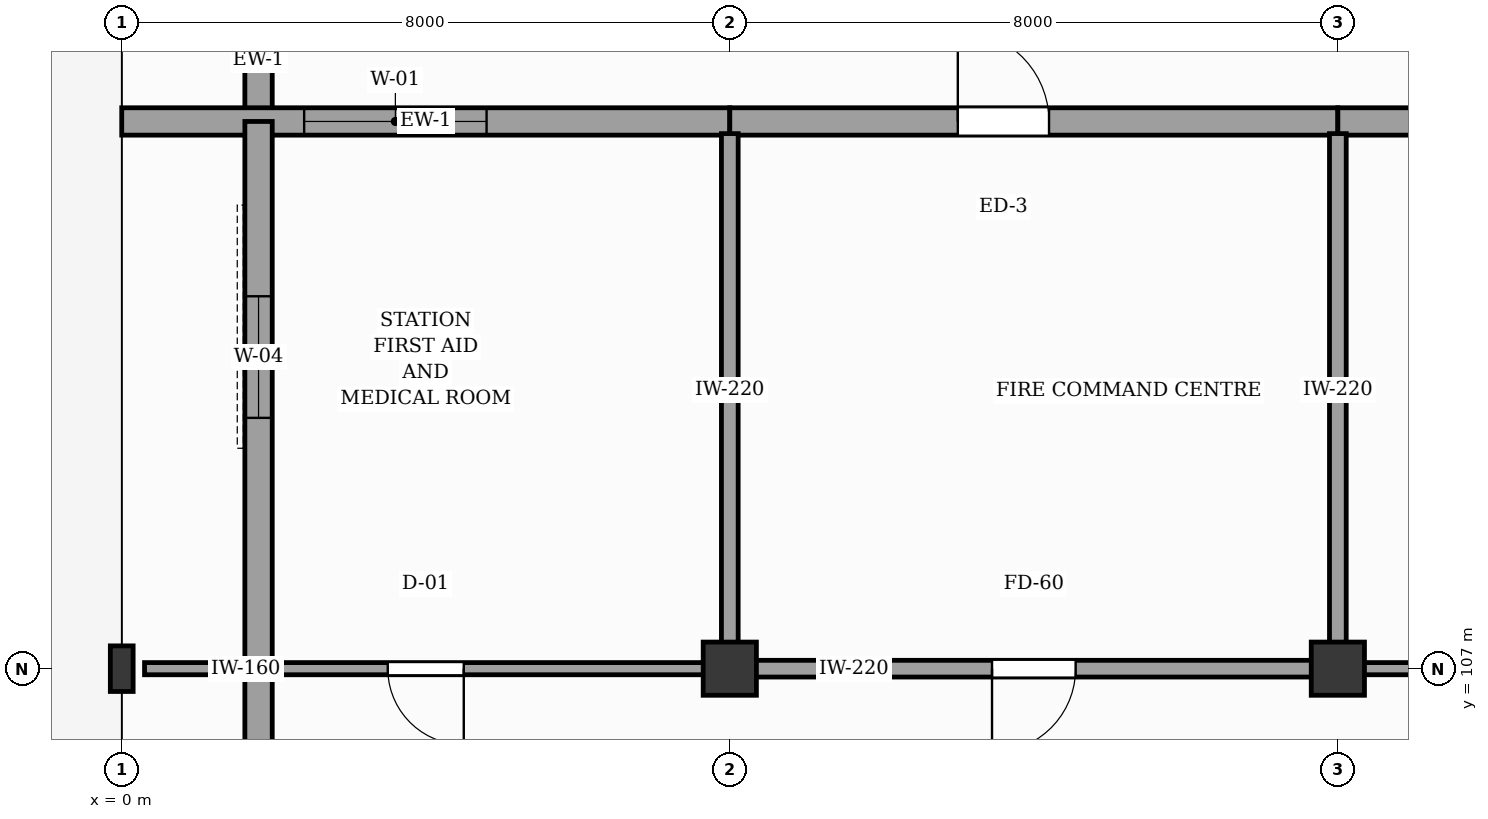
"""IFC4 building model, lengths in metres.
Left out: names, types, materials, properties, quantities, classifications, styles, units other than length and angle.
Written with IfcOpenShell. Run it as: python <this file> out.ifc"""

import sys

from ifc_helpers import new_model, si_unit, direction, frame, frame_2d, origin, origin_2d, place, context, subcontext, project, spatial, rectangle, i_section, extrude, element, fill, save


model = new_model("IFC4")
c1 = context("Model", 3, precision=1e-05, world=origin(), true_north=direction((0.0, 1.0)))
c2 = subcontext(c1, "Body", "Model", "MODEL_VIEW")
j1 = project(units=[si_unit("LENGTHUNIT", "METRE"), si_unit("PLANEANGLEUNIT", "RADIAN")], contexts=[c1])
p1 = place(None, origin())
s1 = spatial("IfcSite", under=j1, at=p1, CompositionType="ELEMENT")
p2 = place(p1, origin())
s2 = spatial("IfcBuilding", under=s1, at=p2, CompositionType="ELEMENT")
p3 = place(p2, origin())
s3 = spatial("IfcBuildingStorey", under=s2, at=p3, CompositionType="ELEMENT", Elevation=0.0)
p4 = place(p3, frame((0.0, 107.0, -0.3), z_axis=(0.0, 0.0, 1.0), x_axis=(1.0, 0.0, 0.0)))
e1 = element("IfcColumn", 1, at=p4, inside=s3, PredefinedType="COLUMN", context=c2, shape_type="SweptSolid", body=[
    extrude(i_section(OverallWidth=0.3, OverallDepth=0.6, WebThickness=0.015, FlangeThickness=0.03, FilletRadius=0.027, at=origin_2d()), origin(), (0.0, 0.0, 1.0), 5.1),
])
for number, where, z_axis, x_axis in (
    (2, (8.0, 107.0, -0.3), (0.0, 0.0, 1.0), (1.0, 0.0, 0.0)),
    (3, (16.0, 107.0, -0.3), (0.0, 0.0, 1.0), (1.0, 0.0, 0.0)),
):
    element("IfcColumn", number, at=place(p3, frame(where, z_axis=z_axis, x_axis=x_axis)), inside=s3, PredefinedType="COLUMN", context=c2, shape_type="SweptSolid", body=[
        extrude(rectangle(XDim=0.7, YDim=0.7, at=origin_2d()), origin(), (0.0, 0.0, 1.0), 5.1),
    ])
p5 = place(p3, frame((1.8, 114.02, 0.0), z_axis=(0.0, 0.0, 1.0), x_axis=(0.0, 1.0, 0.0)))
e4 = element("IfcWall", 4, at=p5, inside=s3, PredefinedType="SOLIDWALL", context=c2, shape_type="SweptSolid", body=[
    extrude(rectangle(XDim=1.98, YDim=0.36, at=frame_2d((0.99, 0.0))), origin(), (0.0, 0.0, 1.0), 3.84),
])
p6 = place(p3, frame((0.0, 114.2, 0.0), z_axis=(0.0, 0.0, 1.0), x_axis=(1.0, 0.0, 0.0)))
e5 = element("IfcWall", 5, at=p6, inside=s3, PredefinedType="SOLIDWALL", context=c2, shape_type="SweptSolid", body=[
    extrude(rectangle(XDim=8.0, YDim=0.36, at=frame_2d((4.0, 0.0))), origin(), (0.0, 0.0, 1.0), 3.84),
])
p7 = place(p6, frame((2.4, 0.0, 0.9)))
e6 = element("IfcOpeningElement", 6, at=p7, cuts=e5, PredefinedType="OPENING", context=c2, shape_type="SweptSolid", body=[
    extrude(rectangle(XDim=2.4, YDim=2.6, at=frame_2d((1.2, 1.3))), frame((0.0, 0.19, 0.0), z_axis=(0.0, -1.0, 0.0), x_axis=(1.0, 0.0, 0.0)), (0.0, 0.0, 1.0), 0.38),
])
p8 = place(p3, frame((8.0, 114.2, 0.0), z_axis=(0.0, 0.0, 1.0), x_axis=(1.0, 0.0, 0.0)))
e7 = element("IfcWall", 7, at=p8, inside=s3, PredefinedType="SOLIDWALL", context=c2, shape_type="SweptSolid", body=[
    extrude(rectangle(XDim=8.0, YDim=0.36, at=frame_2d((4.0, 0.0))), origin(), (0.0, 0.0, 1.0), 3.84),
])
p9 = place(p8, frame((3.0, 0.0, 0.0)))
e8 = element("IfcOpeningElement", 8, at=p9, cuts=e7, PredefinedType="OPENING", context=c2, shape_type="SweptSolid", body=[
    extrude(rectangle(XDim=1.2, YDim=2.2, at=frame_2d((0.6, 1.1))), frame((0.0, 0.19, 0.0), z_axis=(0.0, -1.0, 0.0), x_axis=(1.0, 0.0, 0.0)), (0.0, 0.0, 1.0), 0.38),
])
p10 = place(p3, frame((16.0, 114.2, 0.0), z_axis=(0.0, 0.0, 1.0), x_axis=(1.0, 0.0, 0.0)))
e9 = element("IfcWall", 9, at=p10, inside=s3, PredefinedType="SOLIDWALL", context=c2, shape_type="SweptSolid", body=[
    extrude(rectangle(XDim=8.0, YDim=0.36, at=frame_2d((4.0, 0.0))), origin(), (0.0, 0.0, 1.0), 3.84),
])
p11 = place(p10, frame((2.4, 0.0, 0.0)))
e10 = element("IfcOpeningElement", 10, at=p11, cuts=e9, PredefinedType="OPENING", context=c2, shape_type="SweptSolid", body=[
    extrude(rectangle(XDim=2.4, YDim=2.35, at=frame_2d((1.2, 1.175))), frame((0.0, 0.19, 0.0), z_axis=(0.0, -1.0, 0.0), x_axis=(1.0, 0.0, 0.0)), (0.0, 0.0, 1.0), 0.38),
])
p12 = place(p3, frame((1.8, 98.0, 0.0), z_axis=(0.0, 0.0, 1.0), x_axis=(0.0, 1.0, 0.0)))
e11 = element("IfcWall", 11, at=p12, inside=s3, PredefinedType="SOLIDWALL", context=c2, shape_type="SweptSolid", body=[
    extrude(rectangle(XDim=9.0, YDim=0.36, at=frame_2d((4.5, 0.0))), origin(), (0.0, 0.0, 1.0), 3.71),
])
p13 = place(p12, frame((2.9, 0.0, 0.0)))
e12 = element("IfcOpeningElement", 12, at=p13, cuts=e11, PredefinedType="OPENING", context=c2, shape_type="SweptSolid", body=[
    extrude(rectangle(XDim=2.4, YDim=2.35, at=frame_2d((1.2, 1.175))), frame((0.0, 0.19, 0.0), z_axis=(0.0, -1.0, 0.0), x_axis=(1.0, 0.0, 0.0)), (0.0, 0.0, 1.0), 0.38),
])
p14 = place(p3, frame((1.8, 107.0, 0.0), z_axis=(0.0, 0.0, 1.0), x_axis=(0.0, 1.0, 0.0)))
e13 = element("IfcWall", 13, at=p14, inside=s3, PredefinedType="SOLIDWALL", context=c2, shape_type="SweptSolid", body=[
    extrude(rectangle(XDim=7.2, YDim=0.36, at=frame_2d((3.6, 0.0))), origin(), (0.0, 0.0, 1.0), 3.76),
])
p15 = place(p14, frame((3.3, 0.0, 0.95)))
e14 = element("IfcOpeningElement", 14, at=p15, cuts=e13, PredefinedType="OPENING", context=c2, shape_type="SweptSolid", body=[
    extrude(rectangle(XDim=1.6, YDim=2.1, at=frame_2d((0.8, 1.05))), frame((0.0, 0.19, 0.0), z_axis=(0.0, -1.0, 0.0), x_axis=(1.0, 0.0, 0.0)), (0.0, 0.0, 1.0), 0.38),
])
p16 = place(p3, frame((8.3, 107.0, 0.0), z_axis=(0.0, 0.0, 1.0), x_axis=(1.0, 0.0, 0.0)))
e15 = element("IfcWall", 15, at=p16, inside=s3, PredefinedType="SOLIDWALL", context=c2, shape_type="SweptSolid", body=[
    extrude(rectangle(XDim=7.4, YDim=0.22, at=frame_2d((3.7, 0.0))), origin(), (0.0, 0.0, 1.0), 3.7),
])
p17 = place(p16, frame((3.15, 0.0, 0.0)))
e16 = element("IfcOpeningElement", 16, at=p17, cuts=e15, PredefinedType="OPENING", context=c2, shape_type="SweptSolid", body=[
    extrude(rectangle(XDim=1.1, YDim=2.15, at=frame_2d((0.55, 1.075))), frame((0.0, 0.12, 0.0), z_axis=(0.0, -1.0, 0.0), x_axis=(1.0, 0.0, 0.0)), (0.0, 0.0, 1.0), 0.24),
])
for number, where, z_axis, x_axis in (
    (17, (8.0, 107.3, 0.0), (0.0, 0.0, 1.0), (0.0, 1.0, 0.0)),
    (18, (16.0, 107.3, 0.0), (0.0, 0.0, 1.0), (0.0, 1.0, 0.0)),
):
    element("IfcWall", number, at=place(p3, frame(where, z_axis=z_axis, x_axis=x_axis)), inside=s3, PredefinedType="SOLIDWALL", context=c2, shape_type="SweptSolid", body=[
        extrude(rectangle(XDim=6.74, YDim=0.22, at=frame_2d((3.37, 0.0))), origin(), (0.0, 0.0, 1.0), 3.7),
    ])
p18 = place(p3, frame((0.3, 107.0, 0.0), z_axis=(0.0, 0.0, 1.0), x_axis=(1.0, 0.0, 0.0)))
e19 = element("IfcWall", 19, at=p18, inside=s3, PredefinedType="PARTITIONING", context=c2, shape_type="SweptSolid", body=[
    extrude(rectangle(XDim=7.4, YDim=0.16, at=frame_2d((3.7, 0.0))), origin(), (0.0, 0.0, 1.0), 3.7),
])
p19 = place(p18, frame((3.2, 0.0, 0.0)))
e20 = element("IfcOpeningElement", 20, at=p19, cuts=e19, PredefinedType="OPENING", context=c2, shape_type="SweptSolid", body=[
    extrude(rectangle(XDim=1.0, YDim=2.1, at=frame_2d((0.5, 1.05))), frame((0.0, 0.09, 0.0), z_axis=(0.0, -1.0, 0.0), x_axis=(1.0, 0.0, 0.0)), (0.0, 0.0, 1.0), 0.18),
])
p20 = place(p3, frame((16.3, 107.0, 0.0), z_axis=(0.0, 0.0, 1.0), x_axis=(1.0, 0.0, 0.0)))
e21 = element("IfcWall", 21, at=p20, inside=s3, PredefinedType="PARTITIONING", context=c2, shape_type="SweptSolid", body=[
    extrude(rectangle(XDim=7.4, YDim=0.16, at=frame_2d((3.7, 0.0))), origin(), (0.0, 0.0, 1.0), 3.7),
])
p21 = place(p20, frame((2.7, 0.0, 0.0)))
e22 = element("IfcOpeningElement", 22, at=p21, cuts=e21, PredefinedType="OPENING", context=c2, shape_type="SweptSolid", body=[
    extrude(rectangle(XDim=2.0, YDim=2.3, at=frame_2d((1.0, 1.15))), frame((0.0, 0.09, 0.0), z_axis=(0.0, -1.0, 0.0), x_axis=(1.0, 0.0, 0.0)), (0.0, 0.0, 1.0), 0.18),
])
p22 = place(p7, origin())
e23 = element("IfcWindow", 23, at=p22, inside=s3, PartitioningType="SINGLE_PANEL", PredefinedType="WINDOW", context=c2, shape_type="SweptSolid", body=[
    extrude(rectangle(XDim=2.4, YDim=2.6, at=frame_2d((1.2, 1.3))), frame((0.0, 0.03, 0.0), z_axis=(0.0, -1.0, 0.0), x_axis=(1.0, 0.0, 0.0)), (0.0, 0.0, 1.0), 0.06),
])
fill(e6, e23)
p23 = place(p9, origin())
e24 = element("IfcDoor", 24, at=p23, inside=s3, OperationType="SINGLE_SWING_LEFT", PredefinedType="DOOR", context=c2, shape_type="SweptSolid", body=[
    extrude(rectangle(XDim=1.2, YDim=2.2, at=frame_2d((0.6, 1.1))), frame((0.0, 0.025, 0.0), z_axis=(0.0, -1.0, 0.0), x_axis=(1.0, 0.0, 0.0)), (0.0, 0.0, 1.0), 0.05),
])
fill(e8, e24)
p24 = place(p15, origin())
e25 = element("IfcWindow", 25, at=p24, inside=s3, PartitioningType="SINGLE_PANEL", PredefinedType="WINDOW", context=c2, shape_type="SweptSolid", body=[
    extrude(rectangle(XDim=1.6, YDim=2.1, at=frame_2d((0.8, 1.05))), frame((0.0, 0.03, 0.0), z_axis=(0.0, -1.0, 0.0), x_axis=(1.0, 0.0, 0.0)), (0.0, 0.0, 1.0), 0.06),
])
fill(e14, e25)
p25 = place(p17, frame((1.1, 0.0, 0.0), z_axis=(0.0, 0.0, 1.0), x_axis=(-1.0, 0.0, 0.0)))
e26 = element("IfcDoor", 26, at=p25, inside=s3, OperationType="SINGLE_SWING_LEFT", PredefinedType="DOOR", context=c2, shape_type="SweptSolid", body=[
    extrude(rectangle(XDim=1.1, YDim=2.15, at=frame_2d((0.55, 1.075))), frame((0.0, 0.025, 0.0), z_axis=(0.0, -1.0, 0.0), x_axis=(1.0, 0.0, 0.0)), (0.0, 0.0, 1.0), 0.05),
])
fill(e16, e26)
p26 = place(p19, frame((1.0, 0.0, 0.0), z_axis=(0.0, 0.0, 1.0), x_axis=(-1.0, 0.0, 0.0)))
e27 = element("IfcDoor", 27, at=p26, inside=s3, OperationType="SINGLE_SWING_RIGHT", PredefinedType="DOOR", context=c2, shape_type="SweptSolid", body=[
    extrude(rectangle(XDim=1.0, YDim=2.1, at=frame_2d((0.5, 1.05))), frame((0.0, 0.025, 0.0), z_axis=(0.0, -1.0, 0.0), x_axis=(1.0, 0.0, 0.0)), (0.0, 0.0, 1.0), 0.05),
])
fill(e20, e27)
save(model, sys.argv[1])
